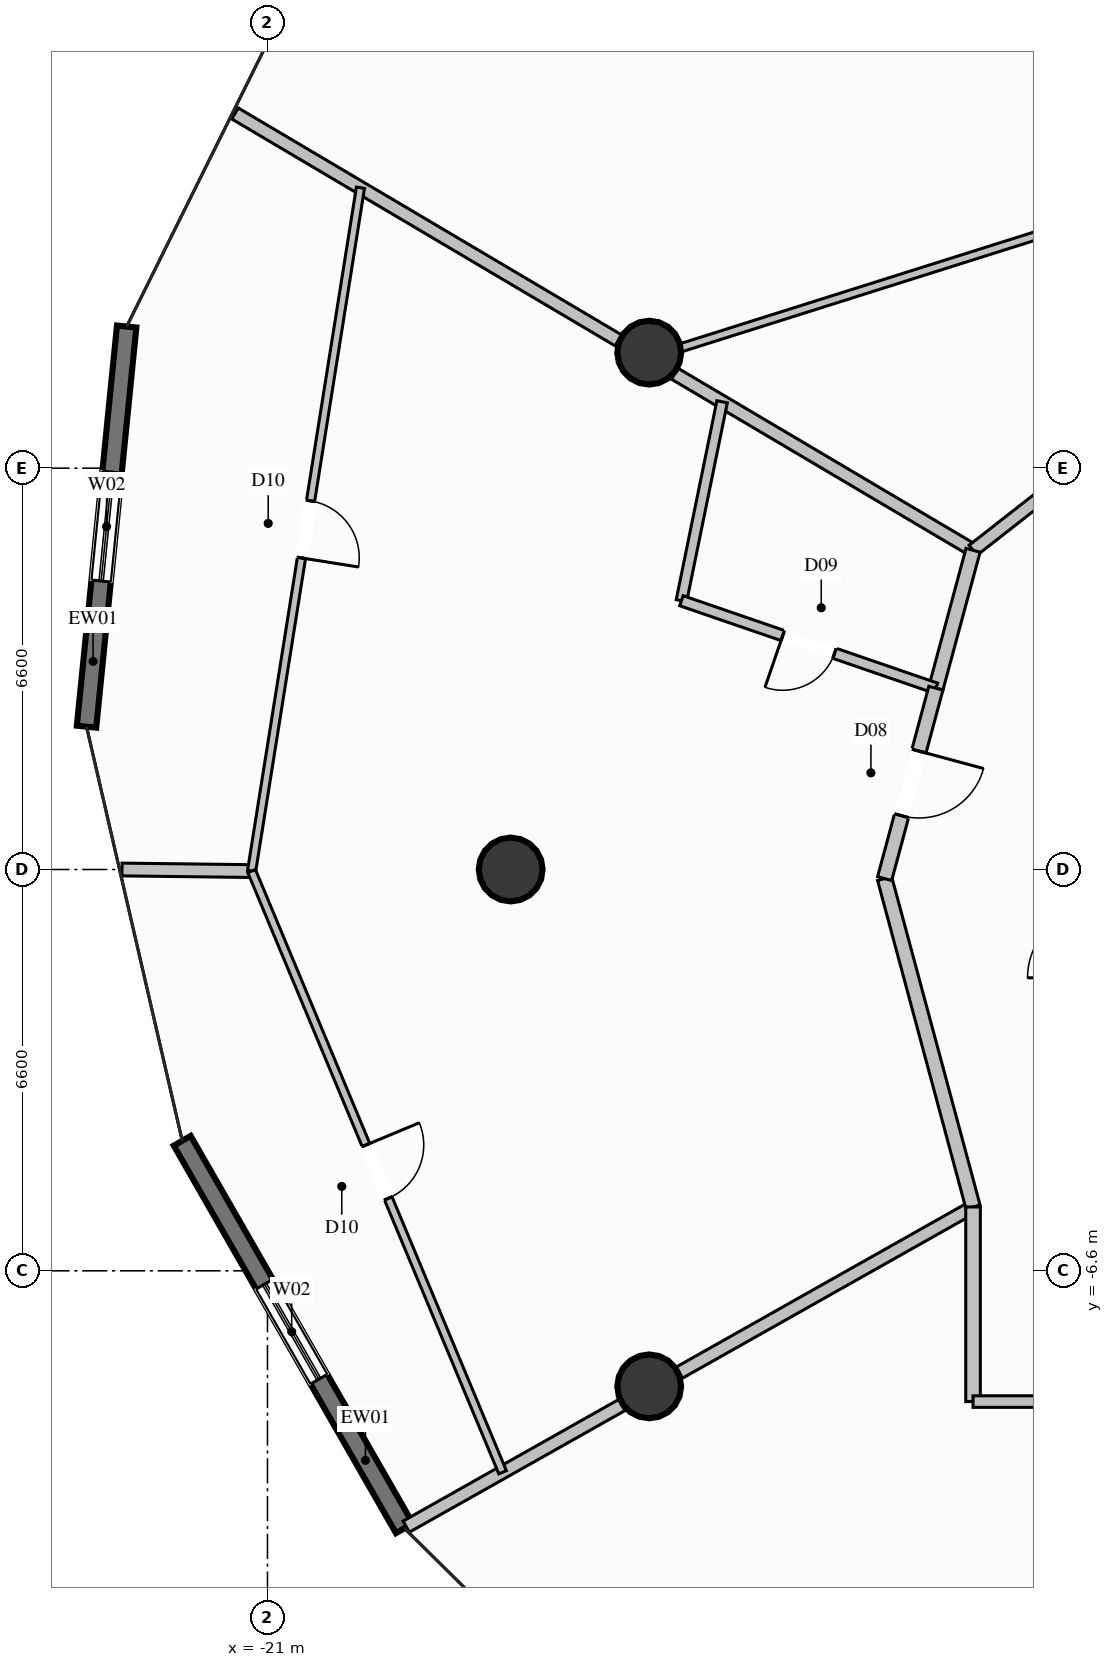
"""IFC4 building model, lengths in metres.
Left out: names, types, materials, properties, quantities, classifications, styles, units other than length and angle.
Written with IfcOpenShell. Run it as: python <this file> out.ifc"""

import sys

from ifc_helpers import new_model, si_unit, direction, frame, frame_2d, origin, origin_2d, place, context, subcontext, project, spatial, rectangle, circle, extrude, element, fill, save


model = new_model("IFC4")
c1 = context("Model", 3, precision=1e-05, world=origin(), true_north=direction((0.0, 1.0)))
c2 = subcontext(c1, "Body", "Model", "MODEL_VIEW")
j1 = project(units=[si_unit("LENGTHUNIT", "METRE"), si_unit("PLANEANGLEUNIT", "RADIAN")], contexts=[c1])
p1 = place(None, origin())
s1 = spatial("IfcSite", under=j1, at=p1, CompositionType="ELEMENT")
p2 = place(p1, origin())
s2 = spatial("IfcBuilding", under=s1, at=p2, CompositionType="ELEMENT")
p3 = place(p2, frame((0.0, 0.0, 124.2)))
s3 = spatial("IfcBuildingStorey", under=s2, at=p3, CompositionType="ELEMENT", Elevation=124.2)
for number, where, z_axis, x_axis in (
    (1, (-14.722, 8.5, 0.0), (0.0, 0.0, 1.0), (1.0, 0.0, 0.0)),
    (2, (-17.0, 0.0, 0.0), (0.0, 0.0, 1.0), (1.0, 0.0, 0.0)),
    (3, (-14.722, -8.5, 0.0), (0.0, 0.0, 1.0), (1.0, 0.0, 0.0)),
):
    element("IfcColumn", number, at=place(p3, frame(where, z_axis=z_axis, x_axis=x_axis)), inside=s3, PredefinedType="COLUMN", context=c2, shape_type="SweptSolid", body=[
        extrude(circle(Radius=0.525, at=origin_2d()), origin(), (0.0, 0.0, 1.0), 3.6),
    ])
p4 = place(p3, frame((-23.976, 2.349, 0.0), z_axis=(0.0, 0.0, 1.0), x_axis=(0.099829039752, 0.995004604423, 0.0)))
e4 = element("IfcWall", 4, at=p4, inside=s3, PredefinedType="SOLIDWALL", context=c2, shape_type="SweptSolid", body=[
    extrude(rectangle(XDim=6.613, YDim=0.32, at=frame_2d((3.306, 0.0))), origin(), (0.0, 0.0, 1.0), 3.35),
])
p5 = place(p4, frame((2.407, 0.0, 0.35)))
e5 = element("IfcOpeningElement", 5, at=p5, cuts=e4, PredefinedType="OPENING", context=c2, shape_type="SweptSolid", body=[
    extrude(rectangle(XDim=1.8, YDim=2.6, at=frame_2d((0.9, 1.3))), frame((0.0, 0.17, 0.0), z_axis=(0.0, -1.0, 0.0), x_axis=(1.0, 0.0, 0.0)), (0.0, 0.0, 1.0), 0.34),
])
p6 = place(p3, frame((-18.748, -10.834, 0.0), z_axis=(0.0, 0.0, 1.0), x_axis=(-0.497401787227, 0.8675202949, 0.0)))
e6 = element("IfcWall", 6, at=p6, inside=s3, PredefinedType="SOLIDWALL", context=c2, shape_type="SweptSolid", body=[
    extrude(rectangle(XDim=7.346, YDim=0.32, at=frame_2d((3.673, 0.0))), origin(), (0.0, 0.0, 1.0), 3.35),
])
p7 = place(p6, frame((2.827, 0.0, 0.35)))
e7 = element("IfcOpeningElement", 7, at=p7, cuts=e6, PredefinedType="OPENING", context=c2, shape_type="SweptSolid", body=[
    extrude(rectangle(XDim=1.8, YDim=2.6, at=frame_2d((0.9, 1.3))), frame((0.0, 0.17, 0.0), z_axis=(0.0, -1.0, 0.0), x_axis=(1.0, 0.0, 0.0)), (0.0, 0.0, 1.0), 0.34),
])
p8 = place(p3, frame((-9.396, 5.25, 0.0), z_axis=(0.0, 0.0, 1.0), x_axis=(-0.860613457584, 0.509258752134, 0.0)))
e8 = element("IfcWall", 8, at=p8, inside=s3, PredefinedType="PARTITIONING", context=c2, shape_type="SweptSolid", body=[
    extrude(rectangle(XDim=5.701, YDim=0.21, at=frame_2d((2.85, 0.0))), origin(), (0.0, 0.0, 1.0), 2.791),
])
p9 = place(p3, frame((-15.228, 8.701, 0.0), z_axis=(0.0, 0.0, 1.0), x_axis=(-0.860570126037, 0.509331972462, 0.0)))
e9 = element("IfcWall", 9, at=p9, inside=s3, PredefinedType="PARTITIONING", context=c2, shape_type="SweptSolid", body=[
    extrude(rectangle(XDim=7.328, YDim=0.21, at=frame_2d((3.664, 0.0))), origin(), (0.0, 0.0, 1.0), 3.35),
])
p10 = place(p3, frame((-9.396, -5.55, 0.0), z_axis=(0.0, 0.0, 1.0), x_axis=(-0.871038847926, -0.491214133962, 0.0)))
e10 = element("IfcWall", 10, at=p10, inside=s3, PredefinedType="PARTITIONING", context=c2, shape_type="SweptSolid", body=[
    extrude(rectangle(XDim=5.545, YDim=0.21, at=frame_2d((2.772, 0.0))), origin(), (0.0, 0.0, 1.0), 2.791),
])
p11 = place(p3, frame((-15.172, -8.807, 0.0), z_axis=(0.0, 0.0, 1.0), x_axis=(-0.871004787506, -0.49127452625, 0.0)))
e11 = element("IfcWall", 11, at=p11, inside=s3, PredefinedType="PARTITIONING", context=c2, shape_type="SweptSolid", body=[
    extrude(rectangle(XDim=4.071, YDim=0.21, at=frame_2d((2.036, 0.0))), origin(), (0.0, 0.0, 1.0), 3.35),
])
p12 = place(p3, frame((-9.396, 5.25, 0.0), z_axis=(0.0, 0.0, 1.0), x_axis=(0.7876993483, 0.6160598483, 0.0)))
e12 = element("IfcWall", 12, at=p12, inside=s3, PredefinedType="PARTITIONING", context=c2, shape_type="SweptSolid", body=[
    extrude(rectangle(XDim=2.597, YDim=0.21, at=frame_2d((1.299, 0.0))), origin(), (0.0, 0.0, 1.0), 3.35),
])
p13 = place(p3, frame((-14.737, 8.411, 0.0), z_axis=(0.0, 0.0, 1.0), x_axis=(0.953650690157, 0.300915870573, 0.0)))
e13 = element("IfcWall", 13, at=p13, inside=s3, PredefinedType="PARTITIONING", context=c2, shape_type="SweptSolid", body=[
    extrude(rectangle(XDim=15.453, YDim=0.135, at=frame_2d((7.727, 0.0))), origin(), (0.0, 0.0, 1.0), 2.879),
])
p14 = place(p13, frame((7.252, 0.0, 0.0)))
e14 = element("IfcOpeningElement", 14, at=p14, cuts=e13, PredefinedType="OPENING", context=c2, shape_type="SweptSolid", body=[
    extrude(rectangle(XDim=0.95, YDim=2.1, at=frame_2d((0.475, 1.05))), frame((0.0, 0.078, 0.0), z_axis=(0.0, -1.0, 0.0), x_axis=(1.0, 0.0, 0.0)), (0.0, 0.0, 1.0), 0.155),
])
p15 = place(p3, frame((-9.396, 5.25, 0.0), z_axis=(0.0, 0.0, 1.0), x_axis=(-0.260152382661, -0.965567572879, 0.0)))
e15 = element("IfcWall", 15, at=p15, inside=s3, PredefinedType="PARTITIONING", context=c2, shape_type="SweptSolid", body=[
    extrude(rectangle(XDim=2.349, YDim=0.24, at=frame_2d((1.174, 0.0))), origin(), (0.0, 0.0, 1.0), 3.35),
])
p16 = place(p3, frame((-13.523, 7.692, 0.0), z_axis=(0.0, 0.0, 1.0), x_axis=(-0.200303741318, -0.979733847131, 0.0)))
e16 = element("IfcWall", 16, at=p16, inside=s3, PredefinedType="PLUMBINGWALL", context=c2, shape_type="SweptSolid", body=[
    extrude(rectangle(XDim=3.34, YDim=0.175, at=frame_2d((1.67, 0.0))), origin(), (0.0, 0.0, 1.0), 3.35),
])
p17 = place(p3, frame((-10.007, 2.982, 0.0), z_axis=(0.0, 0.0, 1.0), x_axis=(-0.945724226407, 0.324970287237, 0.0)))
e17 = element("IfcWall", 17, at=p17, inside=s3, PredefinedType="PLUMBINGWALL", context=c2, shape_type="SweptSolid", body=[
    extrude(rectangle(XDim=4.425, YDim=0.175, at=frame_2d((2.212, 0.0))), origin(), (0.0, 0.0, 1.0), 3.35),
])
p18 = place(p17, frame((1.763, 0.0, 0.0)))
e18 = element("IfcOpeningElement", 18, at=p18, cuts=e17, PredefinedType="OPENING", context=c2, shape_type="SweptSolid", body=[
    extrude(rectangle(XDim=0.9, YDim=2.1, at=frame_2d((0.45, 1.05))), frame((0.0, 0.098, 0.0), z_axis=(0.0, -1.0, 0.0), x_axis=(1.0, 0.0, 0.0)), (0.0, 0.0, 1.0), 0.195),
])
p19 = place(p3, frame((-21.261, -0.026, 0.0), z_axis=(0.0, 0.0, 1.0), x_axis=(-0.99992634422, 0.012136973833, 0.0)))
e19 = element("IfcWall", 19, at=p19, inside=s3, PredefinedType="PARTITIONING", context=c2, shape_type="SweptSolid", body=[
    extrude(rectangle(XDim=2.132, YDim=0.21, at=frame_2d((1.066, 0.0))), origin(), (0.0, 0.0, 1.0), 3.35),
])
p20 = place(p3, frame((-10.85, -0.15, 0.0), z_axis=(0.0, 0.0, 1.0), x_axis=(0.260009481157, -0.965606063417, 0.0)))
e20 = element("IfcWall", 20, at=p20, inside=s3, PredefinedType="PARTITIONING", context=c2, shape_type="SweptSolid", body=[
    extrude(rectangle(XDim=5.593, YDim=0.24, at=frame_2d((2.796, 0.0))), origin(), (0.0, 0.0, 1.0), 3.35),
])
p21 = place(p3, frame((-10.007, 2.982, 0.0), z_axis=(0.0, 0.0, 1.0), x_axis=(-0.259924881751, -0.965628839589, 0.0)))
e21 = element("IfcWall", 21, at=p21, inside=s3, PredefinedType="PARTITIONING", context=c2, shape_type="SweptSolid", body=[
    extrude(rectangle(XDim=3.243, YDim=0.24, at=frame_2d((1.622, 0.0))), origin(), (0.0, 0.0, 1.0), 3.35),
])
p22 = place(p21, frame((1.072, 0.0, 0.0)))
e22 = element("IfcOpeningElement", 22, at=p22, cuts=e21, PredefinedType="OPENING", context=c2, shape_type="SweptSolid", body=[
    extrude(rectangle(XDim=1.1, YDim=2.3, at=frame_2d((0.55, 1.15))), frame((0.0, 0.13, 0.0), z_axis=(0.0, -1.0, 0.0), x_axis=(1.0, 0.0, 0.0)), (0.0, 0.0, 1.0), 0.26),
])
p23 = place(p3, frame((-19.471, 11.212, 0.0), z_axis=(0.0, 0.0, 1.0), x_axis=(-0.157304320927, -0.987550176253, 0.0)))
e23 = element("IfcWall", 23, at=p23, inside=s3, PredefinedType="PARTITIONING", context=c2, shape_type="SweptSolid", body=[
    extrude(rectangle(XDim=11.379, YDim=0.135, at=frame_2d((5.69, 0.0))), origin(), (0.0, 0.0, 1.0), 3.35),
])
p24 = place(p23, frame((5.215, 0.0, 0.0)))
e24 = element("IfcOpeningElement", 24, at=p24, cuts=e23, PredefinedType="OPENING", context=c2, shape_type="SweptSolid", body=[
    extrude(rectangle(XDim=0.95, YDim=2.1, at=frame_2d((0.475, 1.05))), frame((0.0, 0.078, 0.0), z_axis=(0.0, -1.0, 0.0), x_axis=(1.0, 0.0, 0.0)), (0.0, 0.0, 1.0), 0.155),
])
p25 = place(p3, frame((-21.261, -0.026, 0.0), z_axis=(0.0, 0.0, 1.0), x_axis=(0.385272182275, -0.922802983071, 0.0)))
e25 = element("IfcWall", 25, at=p25, inside=s3, PredefinedType="PARTITIONING", context=c2, shape_type="SweptSolid", body=[
    extrude(rectangle(XDim=10.714, YDim=0.135, at=frame_2d((5.357, 0.0))), origin(), (0.0, 0.0, 1.0), 3.35),
])
p26 = place(p25, frame((4.882, 0.0, 0.0)))
e26 = element("IfcOpeningElement", 26, at=p26, cuts=e25, PredefinedType="OPENING", context=c2, shape_type="SweptSolid", body=[
    extrude(rectangle(XDim=0.95, YDim=2.1, at=frame_2d((0.475, 1.05))), frame((0.0, 0.078, 0.0), z_axis=(0.0, -1.0, 0.0), x_axis=(1.0, 0.0, 0.0)), (0.0, 0.0, 1.0), 0.155),
])
p27 = place(p3, frame((-9.396, -5.55, 0.0), z_axis=(0.0, 0.0, 1.0), x_axis=(0.0, -1.0, 0.0)))
e27 = element("IfcWall", 27, at=p27, inside=s3, PredefinedType="PARTITIONING", context=c2, shape_type="SweptSolid", body=[
    extrude(rectangle(XDim=3.2, YDim=0.24, at=frame_2d((1.6, 0.0))), origin(), (0.0, 0.0, 1.0), 3.35),
])
p28 = place(p3, frame((-9.396, -8.75, 0.0), z_axis=(0.0, 0.0, 1.0), x_axis=(1.0, 0.0, 0.0)))
e28 = element("IfcWall", 28, at=p28, inside=s3, PredefinedType="PARTITIONING", context=c2, shape_type="SweptSolid", body=[
    extrude(rectangle(XDim=4.228, YDim=0.19, at=frame_2d((2.114, 0.0))), origin(), (0.0, 0.0, 1.0), 3.35),
])
p29 = place(p28, frame((1.639, 0.0, 0.0)))
e29 = element("IfcOpeningElement", 29, at=p29, cuts=e28, PredefinedType="OPENING", context=c2, shape_type="SweptSolid", body=[
    extrude(rectangle(XDim=0.95, YDim=2.1, at=frame_2d((0.475, 1.05))), frame((0.0, 0.105, 0.0), z_axis=(0.0, -1.0, 0.0), x_axis=(1.0, 0.0, 0.0)), (0.0, 0.0, 1.0), 0.21),
])
p30 = place(p5, origin())
e30 = element("IfcWindow", 30, at=p30, inside=s3, PartitioningType="SINGLE_PANEL", PredefinedType="WINDOW", context=c2, shape_type="SweptSolid", body=[
    extrude(rectangle(XDim=1.8, YDim=2.6, at=frame_2d((0.9, 1.3))), frame((0.0, 0.03, 0.0), z_axis=(0.0, -1.0, 0.0), x_axis=(1.0, 0.0, 0.0)), (0.0, 0.0, 1.0), 0.06),
])
fill(e5, e30)
p31 = place(p7, origin())
e31 = element("IfcWindow", 31, at=p31, inside=s3, PartitioningType="SINGLE_PANEL", PredefinedType="WINDOW", context=c2, shape_type="SweptSolid", body=[
    extrude(rectangle(XDim=1.8, YDim=2.6, at=frame_2d((0.9, 1.3))), frame((0.0, 0.03, 0.0), z_axis=(0.0, -1.0, 0.0), x_axis=(1.0, 0.0, 0.0)), (0.0, 0.0, 1.0), 0.06),
])
fill(e7, e31)
p32 = place(p18, origin())
e32 = element("IfcDoor", 32, at=p32, inside=s3, OperationType="SINGLE_SWING_RIGHT", PredefinedType="DOOR", context=c2, shape_type="SweptSolid", body=[
    extrude(rectangle(XDim=0.9, YDim=2.1, at=frame_2d((0.45, 1.05))), frame((0.0, 0.025, 0.0), z_axis=(0.0, -1.0, 0.0), x_axis=(1.0, 0.0, 0.0)), (0.0, 0.0, 1.0), 0.05),
])
fill(e18, e32)
p33 = place(p22, origin())
e33 = element("IfcDoor", 33, at=p33, inside=s3, OperationType="SINGLE_SWING_LEFT", PredefinedType="DOOR", context=c2, shape_type="SweptSolid", body=[
    extrude(rectangle(XDim=1.1, YDim=2.3, at=frame_2d((0.55, 1.15))), frame((0.0, 0.025, 0.0), z_axis=(0.0, -1.0, 0.0), x_axis=(1.0, 0.0, 0.0)), (0.0, 0.0, 1.0), 0.05),
])
fill(e22, e33)
p34 = place(p24, origin())
e34 = element("IfcDoor", 34, at=p34, inside=s3, OperationType="SINGLE_SWING_RIGHT", PredefinedType="DOOR", context=c2, shape_type="SweptSolid", body=[
    extrude(rectangle(XDim=0.95, YDim=2.1, at=frame_2d((0.475, 1.05))), frame((0.0, 0.025, 0.0), z_axis=(0.0, -1.0, 0.0), x_axis=(1.0, 0.0, 0.0)), (0.0, 0.0, 1.0), 0.05),
])
fill(e24, e34)
p35 = place(p26, origin())
e35 = element("IfcDoor", 35, at=p35, inside=s3, OperationType="SINGLE_SWING_LEFT", PredefinedType="DOOR", context=c2, shape_type="SweptSolid", body=[
    extrude(rectangle(XDim=0.95, YDim=2.1, at=frame_2d((0.475, 1.05))), frame((0.0, 0.025, 0.0), z_axis=(0.0, -1.0, 0.0), x_axis=(1.0, 0.0, 0.0)), (0.0, 0.0, 1.0), 0.05),
])
fill(e26, e35)
save(model, sys.argv[1])
